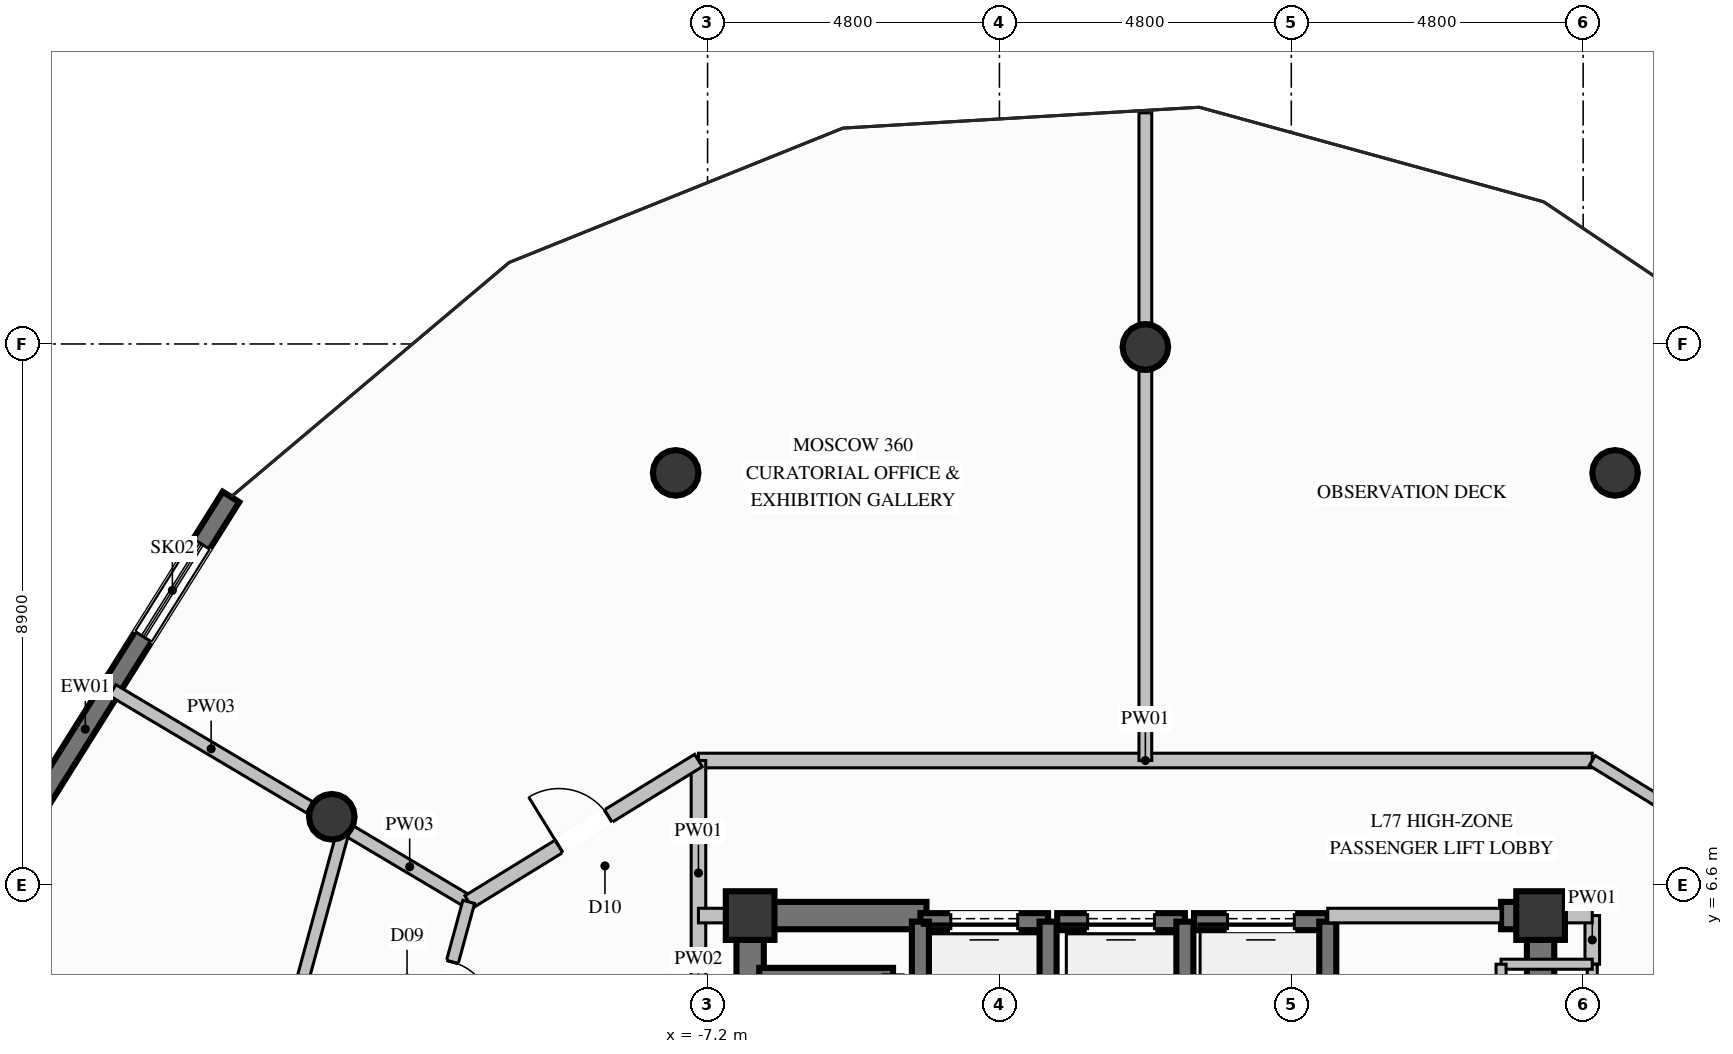
"""IFC4 building model, lengths in metres.
Left out: names, types, materials, properties, quantities, classifications, styles, units other than length and angle.
Written with IfcOpenShell. Run it as: python <this file> out.ifc"""

import sys

from ifc_helpers import new_model, si_unit, direction, frame, frame_2d, origin, origin_2d, place, context, subcontext, project, spatial, rectangle, circle, extrude, element, fill, save


model = new_model("IFC4")
c1 = context("Model", 3, precision=1e-05, world=origin(), true_north=direction((0.0, 1.0)))
c2 = subcontext(c1, "Body", "Model", "MODEL_VIEW")
j1 = project(units=[si_unit("LENGTHUNIT", "METRE"), si_unit("PLANEANGLEUNIT", "RADIAN")], contexts=[c1])
p1 = place(None, origin())
s1 = spatial("IfcSite", under=j1, at=p1, CompositionType="ELEMENT")
p2 = place(p1, origin())
s2 = spatial("IfcBuilding", under=s1, at=p2, CompositionType="ELEMENT")
p3 = place(p2, frame((0.0, 0.0, 297.2)))
s3 = spatial("IfcBuildingStorey", under=s2, at=p3, CompositionType="ELEMENT", Elevation=297.2)
for number, where, z_axis, x_axis in (
    (1, (6.5, 6.1, 0.0), (0.0, 0.0, 1.0), (1.0, 0.0, 0.0)),
    (2, (-6.5, 6.1, 0.0), (0.0, 0.0, 1.0), (1.0, 0.0, 0.0)),
):
    element("IfcColumn", number, at=place(p3, frame(where, z_axis=z_axis, x_axis=x_axis)), inside=s3, PredefinedType="COLUMN", context=c2, shape_type="SweptSolid", body=[
        extrude(rectangle(XDim=0.8, YDim=0.8, at=origin_2d()), origin(), (0.0, 0.0, 1.0), 5.0),
    ])
p4 = place(p3, frame((-6.275, 6.1, 0.0), z_axis=(0.0, 0.0, 1.0), x_axis=(1.0, 0.0, 0.0)))
e3 = element("IfcWall", 3, at=p4, inside=s3, PredefinedType="SHEAR", context=c2, shape_type="SweptSolid", body=[
    extrude(rectangle(XDim=2.675, YDim=0.45, at=frame_2d((1.337, 0.0))), origin(), (0.0, 0.0, 1.0), 5.0),
])
p5 = place(p3, frame((5.85, 6.1, 0.0), z_axis=(0.0, 0.0, 1.0), x_axis=(1.0, 0.0, 0.0)))
e4 = element("IfcWall", 4, at=p5, inside=s3, PredefinedType="SHEAR", context=c2, shape_type="SweptSolid", body=[
    extrude(rectangle(XDim=0.425, YDim=0.45, at=frame_2d((0.212, 0.0))), origin(), (0.0, 0.0, 1.0), 5.0),
])
p6 = place(p3, frame((-6.5, 2.35, 0.0), z_axis=(0.0, 0.0, 1.0), x_axis=(0.0, 1.0, 0.0)))
e5 = element("IfcWall", 5, at=p6, inside=s3, PredefinedType="SHEAR", context=c2, shape_type="SweptSolid", body=[
    extrude(rectangle(XDim=3.975, YDim=0.45, at=frame_2d((1.987, 0.0))), origin(), (0.0, 0.0, 1.0), 5.0),
])
p7 = place(p3, frame((6.5, 3.35, 0.0), z_axis=(0.0, 0.0, 1.0), x_axis=(0.0, 1.0, 0.0)))
e6 = element("IfcWall", 6, at=p7, inside=s3, PredefinedType="SHEAR", context=c2, shape_type="SweptSolid", body=[
    extrude(rectangle(XDim=2.975, YDim=0.45, at=frame_2d((1.487, 0.0))), origin(), (0.0, 0.0, 1.0), 5.0),
])
for number, where, z_axis, x_axis in (
    (7, (7.725, 13.38, 0.0), (0.0, 0.0, 1.0), (1.0, 0.0, 0.0)),
    (8, (0.0, 15.45, 0.0), (0.0, 0.0, 1.0), (1.0, 0.0, 0.0)),
    (9, (-7.725, 13.38, 0.0), (0.0, 0.0, 1.0), (1.0, 0.0, 0.0)),
    (10, (-13.38, 7.725, 0.0), (0.0, 0.0, 1.0), (1.0, 0.0, 0.0)),
):
    element("IfcColumn", number, at=place(p3, frame(where, z_axis=z_axis, x_axis=x_axis)), inside=s3, PredefinedType="COLUMN", context=c2, shape_type="SweptSolid", body=[
        extrude(circle(Radius=0.375, at=origin_2d()), origin(), (0.0, 0.0, 1.0), 5.0),
    ])
p8 = place(p3, frame((-18.255, 7.857, 0.0), z_axis=(0.0, 0.0, 1.0), x_axis=(0.531386665451, 0.847129394945, 0.0)))
e11 = element("IfcWall", 11, at=p8, inside=s3, PredefinedType="SOLIDWALL", context=c2, shape_type="SweptSolid", body=[
    extrude(rectangle(XDim=6.054, YDim=0.32, at=frame_2d((3.027, 0.0))), origin(), (0.0, 0.0, 1.0), 4.72),
])
p9 = place(p8, frame((3.34, 0.0, 0.6)))
e12 = element("IfcOpeningElement", 12, at=p9, cuts=e11, PredefinedType="OPENING", context=c2, shape_type="SweptSolid", body=[
    extrude(rectangle(XDim=1.8, YDim=2.2, at=frame_2d((0.9, 1.1))), frame((0.0, 0.17, 0.0), z_axis=(0.0, -1.0, 0.0), x_axis=(1.0, 0.0, 0.0)), (0.0, 0.0, 1.0), 0.34),
])
p10 = place(p3, frame((-1.6, 6.0, 0.0), z_axis=(0.0, 0.0, 1.0), x_axis=(-1.0, 0.0, 0.0)))
e13 = element("IfcWall", 13, at=p10, inside=s3, PredefinedType="SOLIDWALL", context=c2, shape_type="SweptSolid", body=[
    extrude(rectangle(XDim=2.1, YDim=0.28, at=frame_2d((1.05, 0.0))), origin(), (0.0, 0.0, 1.0), 4.72),
])
p11 = place(p10, frame((0.5, 0.0, 0.0)))
e14 = element("IfcOpeningElement", 14, at=p11, cuts=e13, PredefinedType="OPENING", context=c2, shape_type="SweptSolid", body=[
    extrude(rectangle(XDim=1.1, YDim=2.2, at=frame_2d((0.55, 1.1))), frame((0.0, 0.15, 0.0), z_axis=(0.0, -1.0, 0.0), x_axis=(1.0, 0.0, 0.0)), (0.0, 0.0, 1.0), 0.3),
])
for number, where, z_axis, x_axis in (
    (15, (-3.7, 6.0, 0.0), (0.0, 0.0, 1.0), (0.0, -1.0, 0.0)),
    (16, (-1.6, 3.5, 0.0), (0.0, 0.0, 1.0), (0.0, 1.0, 0.0)),
):
    element("IfcWall", number, at=place(p3, frame(where, z_axis=z_axis, x_axis=x_axis)), inside=s3, PredefinedType="SOLIDWALL", context=c2, shape_type="SweptSolid", body=[
        extrude(rectangle(XDim=2.5, YDim=0.28, at=frame_2d((1.25, 0.0))), origin(), (0.0, 0.0, 1.0), 4.72),
    ])
p12 = place(p3, frame((0.65, 6.0, 0.0), z_axis=(0.0, 0.0, 1.0), x_axis=(-1.0, 0.0, 0.0)))
e17 = element("IfcWall", 17, at=p12, inside=s3, PredefinedType="SOLIDWALL", context=c2, shape_type="SweptSolid", body=[
    extrude(rectangle(XDim=2.1, YDim=0.28, at=frame_2d((1.05, 0.0))), origin(), (0.0, 0.0, 1.0), 4.72),
])
p13 = place(p12, frame((0.5, 0.0, 0.0)))
e18 = element("IfcOpeningElement", 18, at=p13, cuts=e17, PredefinedType="OPENING", context=c2, shape_type="SweptSolid", body=[
    extrude(rectangle(XDim=1.1, YDim=2.2, at=frame_2d((0.55, 1.1))), frame((0.0, 0.15, 0.0), z_axis=(0.0, -1.0, 0.0), x_axis=(1.0, 0.0, 0.0)), (0.0, 0.0, 1.0), 0.3),
])
p14 = place(p3, frame((0.65, 3.5, 0.0), z_axis=(0.0, 0.0, 1.0), x_axis=(0.0, 1.0, 0.0)))
e19 = element("IfcWall", 19, at=p14, inside=s3, PredefinedType="SOLIDWALL", context=c2, shape_type="SweptSolid", body=[
    extrude(rectangle(XDim=2.5, YDim=0.28, at=frame_2d((1.25, 0.0))), origin(), (0.0, 0.0, 1.0), 4.72),
])
p15 = place(p3, frame((3.0, 6.0, 0.0), z_axis=(0.0, 0.0, 1.0), x_axis=(-1.0, 0.0, 0.0)))
e20 = element("IfcWall", 20, at=p15, inside=s3, PredefinedType="SOLIDWALL", context=c2, shape_type="SweptSolid", body=[
    extrude(rectangle(XDim=2.2, YDim=0.28, at=frame_2d((1.1, 0.0))), origin(), (0.0, 0.0, 1.0), 4.72),
])
p16 = place(p15, frame((0.55, 0.0, 0.0)))
e21 = element("IfcOpeningElement", 21, at=p16, cuts=e20, PredefinedType="OPENING", context=c2, shape_type="SweptSolid", body=[
    extrude(rectangle(XDim=1.1, YDim=2.2, at=frame_2d((0.55, 1.1))), frame((0.0, 0.15, 0.0), z_axis=(0.0, -1.0, 0.0), x_axis=(1.0, 0.0, 0.0)), (0.0, 0.0, 1.0), 0.3),
])
p17 = place(p3, frame((3.0, 3.5, 0.0), z_axis=(0.0, 0.0, 1.0), x_axis=(0.0, 1.0, 0.0)))
e22 = element("IfcWall", 22, at=p17, inside=s3, PredefinedType="SOLIDWALL", context=c2, shape_type="SweptSolid", body=[
    extrude(rectangle(XDim=2.5, YDim=0.28, at=frame_2d((1.25, 0.0))), origin(), (0.0, 0.0, 1.0), 4.72),
])
p18 = place(p3, frame((-4.15, 5.1, 0.0), z_axis=(0.0, 0.0, 1.0), x_axis=(-1.0, 0.0, 0.0)))
e23 = element("IfcWall", 23, at=p18, inside=s3, PredefinedType="SOLIDWALL", context=c2, shape_type="SweptSolid", body=[
    extrude(rectangle(XDim=2.2, YDim=0.28, at=frame_2d((1.1, 0.0))), origin(), (0.0, 0.0, 1.0), 4.72),
])
p19 = place(p3, frame((-7.35, 8.65, 0.0), z_axis=(0.0, 0.0, 1.0), x_axis=(1.0, 0.0, 0.0)))
e24 = element("IfcWall", 24, at=p19, inside=s3, PredefinedType="PARTITIONING", context=c2, shape_type="SweptSolid", body=[
    extrude(rectangle(XDim=14.7, YDim=0.24, at=frame_2d((7.35, 0.0))), origin(), (0.0, 0.0, 1.0), 4.72),
])
p20 = place(p3, frame((3.0, 6.1, 0.0), z_axis=(0.0, 0.0, 1.0), x_axis=(1.0, 0.0, 0.0)))
e25 = element("IfcWall", 25, at=p20, inside=s3, PredefinedType="PARTITIONING", context=c2, shape_type="SweptSolid", body=[
    extrude(rectangle(XDim=2.85, YDim=0.24, at=frame_2d((1.425, 0.0))), origin(), (0.0, 0.0, 1.0), 2.905),
])
p21 = place(p3, frame((7.35, 5.3, 0.0), z_axis=(0.0, 0.0, 1.0), x_axis=(0.0, 1.0, 0.0)))
e26 = element("IfcWall", 26, at=p21, inside=s3, PredefinedType="PARTITIONING", context=c2, shape_type="SweptSolid", body=[
    extrude(rectangle(XDim=0.8, YDim=0.24, at=frame_2d((0.4, 0.0))), origin(), (0.0, 0.0, 1.0), 2.905),
])
p22 = place(p3, frame((6.5, 6.1, 0.0), z_axis=(0.0, 0.0, 1.0), x_axis=(1.0, 0.0, 0.0)))
e27 = element("IfcWall", 27, at=p22, inside=s3, PredefinedType="PARTITIONING", context=c2, shape_type="SweptSolid", body=[
    extrude(rectangle(XDim=0.85, YDim=0.24, at=frame_2d((0.425, 0.0))), origin(), (0.0, 0.0, 1.0), 4.72),
])
p23 = place(p3, frame((-7.35, 4.95, 0.0), z_axis=(0.0, 0.0, 1.0), x_axis=(0.0, 1.0, 0.0)))
e28 = element("IfcWall", 28, at=p23, inside=s3, PredefinedType="PARTITIONING", context=c2, shape_type="SweptSolid", body=[
    extrude(rectangle(XDim=3.7, YDim=0.24, at=frame_2d((1.85, 0.0))), origin(), (0.0, 0.0, 1.0), 2.905),
])
p24 = place(p3, frame((-7.35, 6.1, 0.0), z_axis=(0.0, 0.0, 1.0), x_axis=(1.0, 0.0, 0.0)))
e29 = element("IfcWall", 29, at=p24, inside=s3, PredefinedType="PARTITIONING", context=c2, shape_type="SweptSolid", body=[
    extrude(rectangle(XDim=0.85, YDim=0.24, at=frame_2d((0.425, 0.0))), origin(), (0.0, 0.0, 1.0), 4.72),
])
p25 = place(p3, frame((7.35, 2.75, 0.0), z_axis=(0.0, 0.0, 1.0), x_axis=(0.0, 1.0, 0.0)))
e30 = element("IfcWall", 30, at=p25, inside=s3, PredefinedType="PARTITIONING", context=c2, shape_type="SweptSolid", body=[
    extrude(rectangle(XDim=2.55, YDim=0.165, at=frame_2d((1.275, 0.0))), origin(), (0.0, 0.0, 1.0), 2.905),
])
p26 = place(p25, frame((0.75, 0.0, 0.0)))
e31 = element("IfcOpeningElement", 31, at=p26, cuts=e30, PredefinedType="OPENING", context=c2, shape_type="SweptSolid", body=[
    extrude(rectangle(XDim=1.05, YDim=2.15, at=frame_2d((0.525, 1.075))), frame((0.0, 0.093, 0.0), z_axis=(0.0, -1.0, 0.0), x_axis=(1.0, 0.0, 0.0)), (0.0, 0.0, 1.0), 0.185),
])
p27 = place(p3, frame((7.35, 5.3, 0.0), z_axis=(0.0, 0.0, 1.0), x_axis=(-1.0, 0.0, 0.0)))
e32 = element("IfcWall", 32, at=p27, inside=s3, PredefinedType="PARTITIONING", context=c2, shape_type="SweptSolid", body=[
    extrude(rectangle(XDim=1.5, YDim=0.165, at=frame_2d((0.75, 0.0))), origin(), (0.0, 0.0, 1.0), 2.905),
])
p28 = place(p3, frame((5.85, 5.3, 0.0), z_axis=(0.0, 0.0, 1.0), x_axis=(0.0, -1.0, 0.0)))
e33 = element("IfcWall", 33, at=p28, inside=s3, PredefinedType="PARTITIONING", context=c2, shape_type="SweptSolid", body=[
    extrude(rectangle(XDim=2.55, YDim=0.165, at=frame_2d((1.275, 0.0))), origin(), (0.0, 0.0, 1.0), 2.905),
])
p29 = place(p3, frame((-11.128, 6.325, 0.0), z_axis=(0.0, 0.0, 1.0), x_axis=(-0.859601277707, 0.510965403296, 0.0)))
e34 = element("IfcWall", 34, at=p29, inside=s3, PredefinedType="PARTITIONING", context=c2, shape_type="SweptSolid", body=[
    extrude(rectangle(XDim=2.26, YDim=0.21, at=frame_2d((1.13, 0.0))), origin(), (0.0, 0.0, 1.0), 2.905),
])
p30 = place(p3, frame((-13.744, 7.879, 0.0), z_axis=(0.0, 0.0, 1.0), x_axis=(-0.859559716742, 0.511035315174, 0.0)))
e35 = element("IfcWall", 35, at=p30, inside=s3, PredefinedType="PARTITIONING", context=c2, shape_type="SweptSolid", body=[
    extrude(rectangle(XDim=3.771, YDim=0.21, at=frame_2d((1.885, 0.0))), origin(), (0.0, 0.0, 1.0), 4.72),
])
p31 = place(p3, frame((7.35, 8.65, 0.0), z_axis=(0.0, 0.0, 1.0), x_axis=(0.851645088617, -0.524118920699, 0.0)))
e36 = element("IfcWall", 36, at=p31, inside=s3, PredefinedType="PARTITIONING", context=c2, shape_type="SweptSolid", body=[
    extrude(rectangle(XDim=4.436, YDim=0.19, at=frame_2d((2.218, 0.0))), origin(), (0.0, 0.0, 1.0), 4.72),
])
p32 = place(p31, frame((1.318, 0.0, 0.0)))
e37 = element("IfcOpeningElement", 37, at=p32, cuts=e36, PredefinedType="OPENING", context=c2, shape_type="SweptSolid", body=[
    extrude(rectangle(XDim=1.8, YDim=2.4, at=frame_2d((0.9, 1.2))), frame((0.0, 0.105, 0.0), z_axis=(0.0, -1.0, 0.0), x_axis=(1.0, 0.0, 0.0)), (0.0, 0.0, 1.0), 0.21),
])
p33 = place(p3, frame((0.0, 8.65, 0.0), z_axis=(0.0, 0.0, 1.0), x_axis=(0.0, 1.0, 0.0)))
e38 = element("IfcWall", 38, at=p33, inside=s3, PredefinedType="PARTITIONING", context=c2, shape_type="SweptSolid", body=[
    extrude(rectangle(XDim=6.405, YDim=0.21, at=frame_2d((3.203, 0.0))), origin(), (0.0, 0.0, 1.0), 2.905),
])
p34 = place(p3, frame((0.0, 15.845, 0.0), z_axis=(0.0, 0.0, 1.0), x_axis=(0.0, 1.0, 0.0)))
e39 = element("IfcWall", 39, at=p34, inside=s3, PredefinedType="PARTITIONING", context=c2, shape_type="SweptSolid", body=[
    extrude(rectangle(XDim=3.456, YDim=0.21, at=frame_2d((1.728, 0.0))), origin(), (0.0, 0.0, 1.0), 4.72),
])
p35 = place(p3, frame((-11.128, 6.325, 0.0), z_axis=(0.0, 0.0, 1.0), x_axis=(0.851645088617, 0.524118920699, 0.0)))
e40 = element("IfcWall", 40, at=p35, inside=s3, PredefinedType="PARTITIONING", context=c2, shape_type="SweptSolid", body=[
    extrude(rectangle(XDim=4.436, YDim=0.24, at=frame_2d((2.218, 0.0))), origin(), (0.0, 0.0, 1.0), 4.72),
])
p36 = place(p35, frame((1.743, 0.0, 0.0)))
e41 = element("IfcOpeningElement", 41, at=p36, cuts=e40, PredefinedType="OPENING", context=c2, shape_type="SweptSolid", body=[
    extrude(rectangle(XDim=0.95, YDim=2.1, at=frame_2d((0.475, 1.05))), frame((0.0, 0.13, 0.0), z_axis=(0.0, -1.0, 0.0), x_axis=(1.0, 0.0, 0.0)), (0.0, 0.0, 1.0), 0.26),
])
p37 = place(p3, frame((-11.128, 6.325, 0.0), z_axis=(0.0, 0.0, 1.0), x_axis=(-0.262795224233, -0.964851631144, 0.0)))
e42 = element("IfcWall", 42, at=p37, inside=s3, PredefinedType="PLUMBINGWALL", context=c2, shape_type="SweptSolid", body=[
    extrude(rectangle(XDim=2.95, YDim=0.2, at=frame_2d((1.475, 0.0))), origin(), (0.0, 0.0, 1.0), 4.72),
])
p38 = place(p37, frame((1.025, 0.0, 0.0)))
e43 = element("IfcOpeningElement", 43, at=p38, cuts=e42, PredefinedType="OPENING", context=c2, shape_type="SweptSolid", body=[
    extrude(rectangle(XDim=0.9, YDim=2.1, at=frame_2d((0.45, 1.05))), frame((0.0, 0.11, 0.0), z_axis=(0.0, -1.0, 0.0), x_axis=(1.0, 0.0, 0.0)), (0.0, 0.0, 1.0), 0.22),
])
p39 = place(p3, frame((-13.178, 7.543, 0.0), z_axis=(0.0, 0.0, 1.0), x_axis=(-0.263217227178, -0.964736591675, 0.0)))
e44 = element("IfcWall", 44, at=p39, inside=s3, PredefinedType="PLUMBINGWALL", context=c2, shape_type="SweptSolid", body=[
    extrude(rectangle(XDim=3.518, YDim=0.2, at=frame_2d((1.759, 0.0))), origin(), (0.0, 0.0, 1.0), 4.247),
])
p40 = place(p9, origin())
e45 = element("IfcWindow", 45, at=p40, inside=s3, PartitioningType="SINGLE_PANEL", PredefinedType="SKYLIGHT", context=c2, shape_type="SweptSolid", body=[
    extrude(rectangle(XDim=1.8, YDim=2.2, at=frame_2d((0.9, 1.1))), frame((0.0, 0.03, 0.0), z_axis=(0.0, -1.0, 0.0), x_axis=(1.0, 0.0, 0.0)), (0.0, 0.0, 1.0), 0.06),
])
fill(e12, e45)
p41 = place(p11, origin())
e46 = element("IfcDoor", 46, at=p41, inside=s3, OperationType="SLIDING_TO_LEFT", PredefinedType="DOOR", context=c2, shape_type="SweptSolid", body=[
    extrude(rectangle(XDim=1.1, YDim=2.2, at=frame_2d((0.55, 1.1))), frame((0.0, 0.025, 0.0), z_axis=(0.0, -1.0, 0.0), x_axis=(1.0, 0.0, 0.0)), (0.0, 0.0, 1.0), 0.05),
])
fill(e14, e46)
p42 = place(p13, origin())
e47 = element("IfcDoor", 47, at=p42, inside=s3, OperationType="SLIDING_TO_LEFT", PredefinedType="DOOR", context=c2, shape_type="SweptSolid", body=[
    extrude(rectangle(XDim=1.1, YDim=2.2, at=frame_2d((0.55, 1.1))), frame((0.0, 0.025, 0.0), z_axis=(0.0, -1.0, 0.0), x_axis=(1.0, 0.0, 0.0)), (0.0, 0.0, 1.0), 0.05),
])
fill(e18, e47)
p43 = place(p16, origin())
e48 = element("IfcDoor", 48, at=p43, inside=s3, OperationType="SLIDING_TO_LEFT", PredefinedType="DOOR", context=c2, shape_type="SweptSolid", body=[
    extrude(rectangle(XDim=1.1, YDim=2.2, at=frame_2d((0.55, 1.1))), frame((0.0, 0.025, 0.0), z_axis=(0.0, -1.0, 0.0), x_axis=(1.0, 0.0, 0.0)), (0.0, 0.0, 1.0), 0.05),
])
fill(e21, e48)
p44 = place(p36, origin())
e49 = element("IfcDoor", 49, at=p44, inside=s3, OperationType="SINGLE_SWING_LEFT", PredefinedType="DOOR", context=c2, shape_type="SweptSolid", body=[
    extrude(rectangle(XDim=0.95, YDim=2.1, at=frame_2d((0.475, 1.05))), frame((0.0, 0.025, 0.0), z_axis=(0.0, -1.0, 0.0), x_axis=(1.0, 0.0, 0.0)), (0.0, 0.0, 1.0), 0.05),
])
fill(e41, e49)
p45 = place(p38, origin())
e50 = element("IfcDoor", 50, at=p45, inside=s3, OperationType="SINGLE_SWING_RIGHT", PredefinedType="DOOR", context=c2, shape_type="SweptSolid", body=[
    extrude(rectangle(XDim=0.9, YDim=2.1, at=frame_2d((0.45, 1.05))), frame((0.0, 0.025, 0.0), z_axis=(0.0, -1.0, 0.0), x_axis=(1.0, 0.0, 0.0)), (0.0, 0.0, 1.0), 0.05),
])
fill(e43, e50)
save(model, sys.argv[1])
